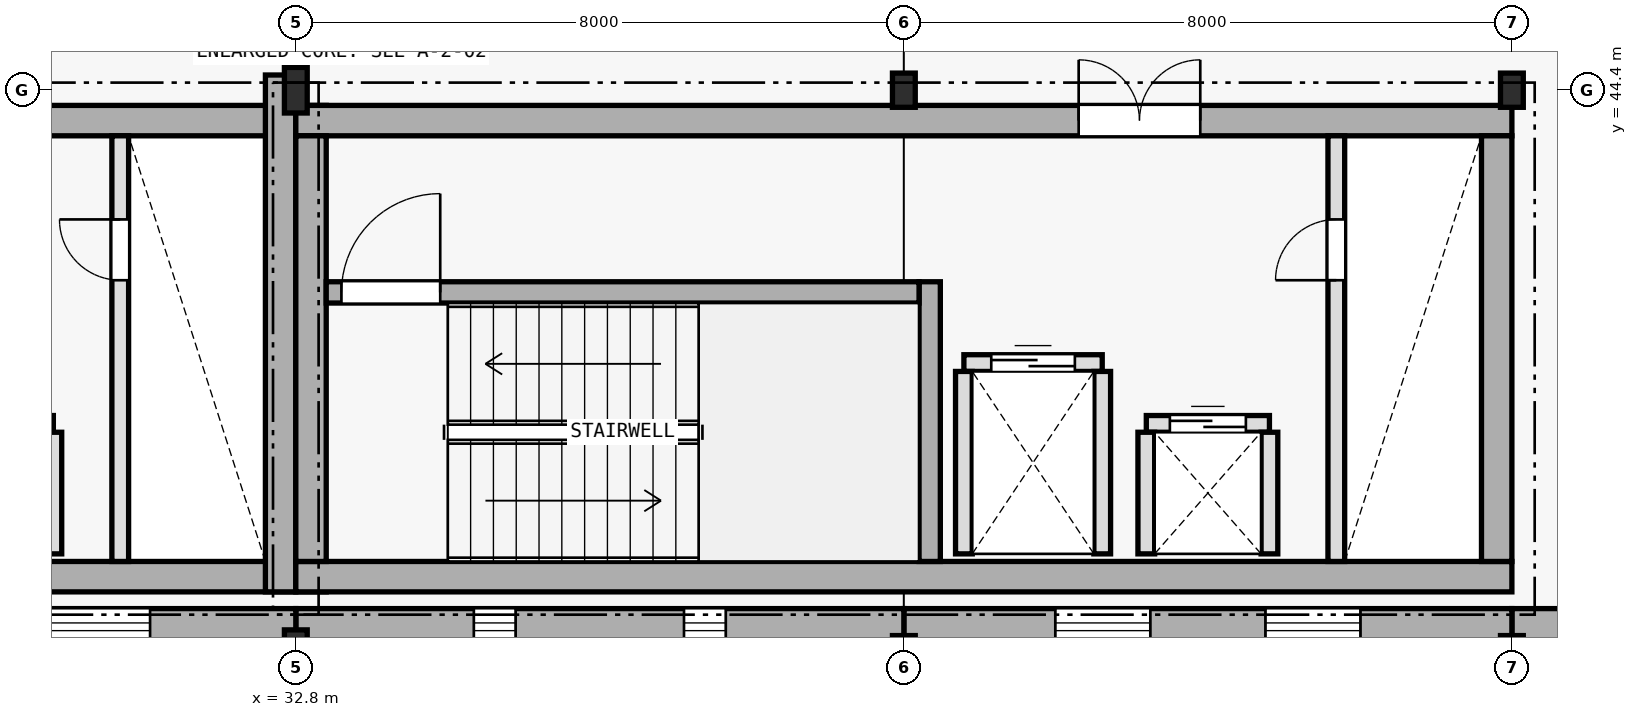
"""IFC4 building model, lengths in metres.
Left out: names, types, materials, properties, quantities, classifications, styles, units other than length and angle.
Written with IfcOpenShell. Run it as: python <this file> out.ifc"""

import sys

from ifc_helpers import new_model, si_unit, direction, frame, frame_2d, origin, origin_2d, place, context, subcontext, project, spatial, rectangle, i_section, extrude, element, fill, save


model = new_model("IFC4")
c1 = context("Model", 3, precision=1e-05, world=origin(), true_north=direction((0.0, 1.0)))
c2 = subcontext(c1, "Body", "Model", "MODEL_VIEW")
j1 = project(units=[si_unit("LENGTHUNIT", "METRE"), si_unit("PLANEANGLEUNIT", "RADIAN")], contexts=[c1])
p1 = place(None, origin())
s1 = spatial("IfcSite", under=j1, at=p1, CompositionType="ELEMENT")
p2 = place(p1, origin())
s2 = spatial("IfcBuilding", under=s1, at=p2, CompositionType="ELEMENT")
p3 = place(p2, frame((0.0, 0.0, 9.9)))
s3 = spatial("IfcBuildingStorey", under=s2, at=p3, CompositionType="ELEMENT", Elevation=9.9)
p4 = place(p3, frame((16.8, 38.0, 0.0), z_axis=(0.0, 0.0, 1.0), x_axis=(1.0, 0.0, 0.0)))
e1 = element("IfcWall", 1, at=p4, inside=s3, PredefinedType="SHEAR", context=c2, shape_type="SweptSolid", body=[
    extrude(rectangle(XDim=16.4, YDim=0.4, at=frame_2d((8.2, 0.0))), origin(), (0.0, 0.0, 1.0), 4.195),
])
p5 = place(p3, frame((16.8, 44.0, 0.0), z_axis=(0.0, 0.0, 1.0), x_axis=(1.0, 0.0, 0.0)))
e2 = element("IfcWall", 2, at=p5, inside=s3, PredefinedType="SHEAR", context=c2, shape_type="SweptSolid", body=[
    extrude(rectangle(XDim=16.4, YDim=0.4, at=frame_2d((8.2, 0.0))), origin(), (0.0, 0.0, 1.0), 4.195),
])
p6 = place(p5, frame((10.3, 0.0, 0.0)))
e3 = element("IfcOpeningElement", 3, at=p6, cuts=e2, PredefinedType="OPENING", context=c2, shape_type="SweptSolid", body=[
    extrude(rectangle(XDim=1.6, YDim=2.2, at=frame_2d((0.8, 1.1))), frame((0.0, 0.21, 0.0), z_axis=(0.0, -1.0, 0.0), x_axis=(1.0, 0.0, 0.0)), (0.0, 0.0, 1.0), 0.42),
])
p7 = place(p3, frame((32.6, 37.8, 0.0), z_axis=(0.0, 0.0, 1.0), x_axis=(0.0, 1.0, 0.0)))
e4 = element("IfcWall", 4, at=p7, inside=s3, PredefinedType="SHEAR", context=c2, shape_type="SweptSolid", body=[
    extrude(rectangle(XDim=6.8, YDim=0.4, at=frame_2d((3.4, 0.0))), origin(), (0.0, 0.0, 1.0), 4.195),
])
p8 = place(p3, frame((32.8, 38.0, 0.0), z_axis=(0.0, 0.0, 1.0), x_axis=(1.0, 0.0, 0.0)))
e5 = element("IfcWall", 5, at=p8, inside=s3, PredefinedType="SHEAR", context=c2, shape_type="SweptSolid", body=[
    extrude(rectangle(XDim=16.0, YDim=0.4, at=frame_2d((8.0, 0.0))), origin(), (0.0, 0.0, 1.0), 4.195),
])
p9 = place(p3, frame((32.8, 44.0, 0.0), z_axis=(0.0, 0.0, 1.0), x_axis=(1.0, 0.0, 0.0)))
e6 = element("IfcWall", 6, at=p9, inside=s3, PredefinedType="SHEAR", context=c2, shape_type="SweptSolid", body=[
    extrude(rectangle(XDim=16.0, YDim=0.4, at=frame_2d((8.0, 0.0))), origin(), (0.0, 0.0, 1.0), 4.195),
])
p10 = place(p9, frame((10.3, 0.0, 0.0)))
e7 = element("IfcOpeningElement", 7, at=p10, cuts=e6, PredefinedType="OPENING", context=c2, shape_type="SweptSolid", body=[
    extrude(rectangle(XDim=1.6, YDim=2.2, at=frame_2d((0.8, 1.1))), frame((0.0, 0.21, 0.0), z_axis=(0.0, -1.0, 0.0), x_axis=(1.0, 0.0, 0.0)), (0.0, 0.0, 1.0), 0.42),
])
for number, where, z_axis, x_axis in (
    (8, (33.0, 38.2, 0.0), (0.0, 0.0, 1.0), (0.0, 1.0, 0.0)),
    (9, (48.6, 38.2, 0.0), (0.0, 0.0, 1.0), (0.0, 1.0, 0.0)),
):
    element("IfcWall", number, at=place(p3, frame(where, z_axis=z_axis, x_axis=x_axis)), inside=s3, PredefinedType="SHEAR", context=c2, shape_type="SweptSolid", body=[
        extrude(rectangle(XDim=5.6, YDim=0.4, at=frame_2d((2.8, 0.0))), origin(), (0.0, 0.0, 1.0), 4.195),
    ])
p11 = place(p3, frame((41.14, 38.2, 0.0), z_axis=(0.0, 0.0, 1.0), x_axis=(0.0, 1.0, 0.0)))
e10 = element("IfcWall", 10, at=p11, inside=s3, PredefinedType="SHEAR", context=c2, shape_type="SweptSolid", body=[
    extrude(rectangle(XDim=3.68, YDim=0.28, at=frame_2d((1.84, 0.0))), origin(), (0.0, 0.0, 1.0), 4.195),
])
p12 = place(p3, frame((33.2, 41.74, 0.0), z_axis=(0.0, 0.0, 1.0), x_axis=(1.0, 0.0, 0.0)))
e11 = element("IfcWall", 11, at=p12, inside=s3, PredefinedType="SHEAR", context=c2, shape_type="SweptSolid", body=[
    extrude(rectangle(XDim=7.8, YDim=0.28, at=frame_2d((3.9, 0.0))), origin(), (0.0, 0.0, 1.0), 4.195),
])
p13 = place(p12, frame((0.2, 0.0, 0.0)))
e12 = element("IfcOpeningElement", 12, at=p13, cuts=e11, PredefinedType="OPENING", context=c2, shape_type="SweptSolid", body=[
    extrude(rectangle(XDim=1.3, YDim=2.2, at=frame_2d((0.65, 1.1))), frame((0.0, 0.15, 0.0), z_axis=(0.0, -1.0, 0.0), x_axis=(1.0, 0.0, 0.0)), (0.0, 0.0, 1.0), 0.3),
])
for number, where, z_axis, x_axis in (
    (13, (32.8, 37.0, 0.0), (0.0, 0.0, 1.0), (1.0, 0.0, 0.0)),
    (14, (32.8, 44.4, 0.0), (0.0, 0.0, 1.0), (1.0, 0.0, 0.0)),
):
    element("IfcColumn", number, at=place(p3, frame(where, z_axis=z_axis, x_axis=x_axis)), inside=s3, PredefinedType="COLUMN", context=c2, shape_type="SweptSolid", body=[
        extrude(i_section(OverallWidth=0.3, OverallDepth=0.6, WebThickness=0.015, FlangeThickness=0.03, FilletRadius=0.027, at=origin_2d()), origin(), (0.0, 0.0, 1.0), 4.2),
    ])
for number, where, z_axis, x_axis in (
    (15, (40.8, 37.0, 0.0), (0.0, 0.0, 1.0), (1.0, 0.0, 0.0)),
    (16, (40.8, 44.4, 0.0), (0.0, 0.0, 1.0), (1.0, 0.0, 0.0)),
    (17, (48.8, 37.0, 0.0), (0.0, 0.0, 1.0), (1.0, 0.0, 0.0)),
    (18, (48.8, 44.4, 0.0), (0.0, 0.0, 1.0), (1.0, 0.0, 0.0)),
):
    element("IfcColumn", number, at=place(p3, frame(where, z_axis=z_axis, x_axis=x_axis)), inside=s3, PredefinedType="COLUMN", context=c2, shape_type="SweptSolid", body=[
        extrude(i_section(OverallWidth=0.3, OverallDepth=0.45, WebThickness=0.014, FlangeThickness=0.026, FilletRadius=0.027, at=origin_2d()), origin(), (0.0, 0.0, 1.0), 4.2),
    ])
p14 = place(p3, frame((56.612, 37.29, 0.0), z_axis=(0.0, 0.0, 1.0), x_axis=(-1.0, 0.0, 0.0)))
e19 = element("IfcWall", 19, at=p14, inside=s3, PredefinedType="STANDARD", context=c2, shape_type="SweptSolid", body=[
    extrude(rectangle(XDim=7.812, YDim=0.58, at=frame_2d((3.906, 0.0))), origin(), (0.0, 0.0, 1.0), 3.955),
])
p15 = place(p14, frame((2.901, 0.0, 0.9)))
e20 = element("IfcOpeningElement", 20, at=p15, cuts=e19, PredefinedType="OPENING", context=c2, shape_type="SweptSolid", body=[
    extrude(rectangle(XDim=1.85, YDim=2.2, at=frame_2d((0.925, 1.1))), frame((0.0, 0.3, 0.0), z_axis=(0.0, -1.0, 0.0), x_axis=(1.0, 0.0, 0.0)), (0.0, 0.0, 1.0), 0.6),
])
p16 = place(p3, frame((48.8, 37.29, 0.0), z_axis=(0.0, 0.0, 1.0), x_axis=(-1.0, 0.0, 0.0)))
e21 = element("IfcWall", 21, at=p16, inside=s3, PredefinedType="STANDARD", context=c2, shape_type="SweptSolid", body=[
    extrude(rectangle(XDim=8.0, YDim=0.58, at=frame_2d((4.0, 0.0))), origin(), (0.0, 0.0, 1.0), 3.955),
])
p17 = place(p16, frame((1.993, 0.0, 0.9)))
e22 = element("IfcOpeningElement", 22, at=p17, cuts=e21, PredefinedType="OPENING", context=c2, shape_type="SweptSolid", body=[
    extrude(rectangle(XDim=1.25, YDim=2.45, at=frame_2d((0.625, 1.225))), frame((0.0, 0.3, 0.0), z_axis=(0.0, -1.0, 0.0), x_axis=(1.0, 0.0, 0.0)), (0.0, 0.0, 1.0), 0.6),
])
p18 = place(p16, frame((4.757, 0.0, 0.9)))
e23 = element("IfcOpeningElement", 23, at=p18, cuts=e21, PredefinedType="OPENING", context=c2, shape_type="SweptSolid", body=[
    extrude(rectangle(XDim=1.25, YDim=2.45, at=frame_2d((0.625, 1.225))), frame((0.0, 0.3, 0.0), z_axis=(0.0, -1.0, 0.0), x_axis=(1.0, 0.0, 0.0)), (0.0, 0.0, 1.0), 0.6),
])
p19 = place(p3, frame((40.8, 37.29, 0.0), z_axis=(0.0, 0.0, 1.0), x_axis=(-1.0, 0.0, 0.0)))
e24 = element("IfcWall", 24, at=p19, inside=s3, PredefinedType="STANDARD", context=c2, shape_type="SweptSolid", body=[
    extrude(rectangle(XDim=8.0, YDim=0.58, at=frame_2d((4.0, 0.0))), origin(), (0.0, 0.0, 1.0), 3.955),
])
p20 = place(p19, frame((2.343, 0.0, 0.9)))
e25 = element("IfcOpeningElement", 25, at=p20, cuts=e24, PredefinedType="OPENING", context=c2, shape_type="SweptSolid", body=[
    extrude(rectangle(XDim=0.55, YDim=1.75, at=frame_2d((0.275, 0.875))), frame((0.0, 0.3, 0.0), z_axis=(0.0, -1.0, 0.0), x_axis=(1.0, 0.0, 0.0)), (0.0, 0.0, 1.0), 0.6),
])
p21 = place(p19, frame((5.107, 0.0, 0.9)))
e26 = element("IfcOpeningElement", 26, at=p21, cuts=e24, PredefinedType="OPENING", context=c2, shape_type="SweptSolid", body=[
    extrude(rectangle(XDim=0.55, YDim=1.75, at=frame_2d((0.275, 0.875))), frame((0.0, 0.3, 0.0), z_axis=(0.0, -1.0, 0.0), x_axis=(1.0, 0.0, 0.0)), (0.0, 0.0, 1.0), 0.6),
])
p22 = place(p3, frame((32.8, 37.29, 0.0), z_axis=(0.0, 0.0, 1.0), x_axis=(-1.0, 0.0, 0.0)))
e27 = element("IfcWall", 27, at=p22, inside=s3, PredefinedType="STANDARD", context=c2, shape_type="SweptSolid", body=[
    extrude(rectangle(XDim=8.0, YDim=0.58, at=frame_2d((4.0, 0.0))), origin(), (0.0, 0.0, 1.0), 3.955),
])
p23 = place(p22, frame((1.917, 0.0, 0.9)))
e28 = element("IfcOpeningElement", 28, at=p23, cuts=e27, PredefinedType="OPENING", context=c2, shape_type="SweptSolid", body=[
    extrude(rectangle(XDim=1.4, YDim=1.75, at=frame_2d((0.7, 0.875))), frame((0.0, 0.3, 0.0), z_axis=(0.0, -1.0, 0.0), x_axis=(1.0, 0.0, 0.0)), (0.0, 0.0, 1.0), 0.6),
])
p24 = place(p22, frame((4.682, 0.0, 0.9)))
e29 = element("IfcOpeningElement", 29, at=p24, cuts=e27, PredefinedType="OPENING", context=c2, shape_type="SweptSolid", body=[
    extrude(rectangle(XDim=1.4, YDim=1.75, at=frame_2d((0.7, 0.875))), frame((0.0, 0.3, 0.0), z_axis=(0.0, -1.0, 0.0), x_axis=(1.0, 0.0, 0.0)), (0.0, 0.0, 1.0), 0.6),
])
p25 = place(p3, frame((27.99, 40.01, 0.0), z_axis=(0.0, 0.0, 1.0), x_axis=(1.0, 0.0, 0.0)))
e30 = element("IfcWall", 30, at=p25, inside=s3, PredefinedType="PLUMBINGWALL", context=c2, shape_type="SweptSolid", body=[
    extrude(rectangle(XDim=1.62, YDim=0.22, at=frame_2d((0.81, 0.0))), origin(), (0.0, 0.0, 1.0), 3.92),
])
p26 = place(p25, frame((0.31, 0.0, 0.0)))
e31 = element("IfcOpeningElement", 31, at=p26, cuts=e30, PredefinedType="OPENING", context=c2, shape_type="SweptSolid", body=[
    extrude(rectangle(XDim=1.0, YDim=2.2, at=frame_2d((0.5, 1.1))), frame((0.0, 0.12, 0.0), z_axis=(0.0, -1.0, 0.0), x_axis=(1.0, 0.0, 0.0)), (0.0, 0.0, 1.0), 0.24),
])
p27 = place(p3, frame((29.61, 38.3, 0.0), z_axis=(0.0, 0.0, 1.0), x_axis=(0.0, 1.0, 0.0)))
e32 = element("IfcWall", 32, at=p27, inside=s3, PredefinedType="PLUMBINGWALL", context=c2, shape_type="SweptSolid", body=[
    extrude(rectangle(XDim=1.6, YDim=0.22, at=frame_2d((0.8, 0.0))), origin(), (0.0, 0.0, 1.0), 3.92),
])
p28 = place(p3, frame((30.49, 38.2, 0.0), z_axis=(0.0, 0.0, 1.0), x_axis=(0.0, 1.0, 0.0)))
e33 = element("IfcWall", 33, at=p28, inside=s3, PredefinedType="PLUMBINGWALL", context=c2, shape_type="SweptSolid", body=[
    extrude(rectangle(XDim=5.6, YDim=0.22, at=frame_2d((2.8, 0.0))), origin(), (0.0, 0.0, 1.0), 3.92),
])
p29 = place(p28, frame((3.7, 0.0, 0.0)))
e34 = element("IfcOpeningElement", 34, at=p29, cuts=e33, PredefinedType="OPENING", context=c2, shape_type="SweptSolid", body=[
    extrude(rectangle(XDim=0.8, YDim=2.1, at=frame_2d((0.4, 1.05))), frame((0.0, 0.12, 0.0), z_axis=(0.0, -1.0, 0.0), x_axis=(1.0, 0.0, 0.0)), (0.0, 0.0, 1.0), 0.24),
])
p30 = place(p3, frame((41.59, 40.81, 0.0), z_axis=(0.0, 0.0, 1.0), x_axis=(1.0, 0.0, 0.0)))
e35 = element("IfcWall", 35, at=p30, inside=s3, PredefinedType="PLUMBINGWALL", context=c2, shape_type="SweptSolid", body=[
    extrude(rectangle(XDim=1.82, YDim=0.22, at=frame_2d((0.91, 0.0))), origin(), (0.0, 0.0, 1.0), 3.92),
])
p31 = place(p30, frame((0.36, 0.0, 0.0)))
e36 = element("IfcOpeningElement", 36, at=p31, cuts=e35, PredefinedType="OPENING", context=c2, shape_type="SweptSolid", body=[
    extrude(rectangle(XDim=1.1, YDim=2.2, at=frame_2d((0.55, 1.1))), frame((0.0, 0.12, 0.0), z_axis=(0.0, -1.0, 0.0), x_axis=(1.0, 0.0, 0.0)), (0.0, 0.0, 1.0), 0.24),
])
for number, where, z_axis, x_axis in (
    (37, (41.59, 38.3, 0.0), (0.0, 0.0, 1.0), (0.0, 1.0, 0.0)),
    (38, (43.41, 38.3, 0.0), (0.0, 0.0, 1.0), (0.0, 1.0, 0.0)),
):
    element("IfcWall", number, at=place(p3, frame(where, z_axis=z_axis, x_axis=x_axis)), inside=s3, PredefinedType="PLUMBINGWALL", context=c2, shape_type="SweptSolid", body=[
        extrude(rectangle(XDim=2.4, YDim=0.22, at=frame_2d((1.2, 0.0))), origin(), (0.0, 0.0, 1.0), 3.92),
    ])
p32 = place(p3, frame((43.99, 40.01, 0.0), z_axis=(0.0, 0.0, 1.0), x_axis=(1.0, 0.0, 0.0)))
e39 = element("IfcWall", 39, at=p32, inside=s3, PredefinedType="PLUMBINGWALL", context=c2, shape_type="SweptSolid", body=[
    extrude(rectangle(XDim=1.62, YDim=0.22, at=frame_2d((0.81, 0.0))), origin(), (0.0, 0.0, 1.0), 3.92),
])
p33 = place(p32, frame((0.31, 0.0, 0.0)))
e40 = element("IfcOpeningElement", 40, at=p33, cuts=e39, PredefinedType="OPENING", context=c2, shape_type="SweptSolid", body=[
    extrude(rectangle(XDim=1.0, YDim=2.2, at=frame_2d((0.5, 1.1))), frame((0.0, 0.12, 0.0), z_axis=(0.0, -1.0, 0.0), x_axis=(1.0, 0.0, 0.0)), (0.0, 0.0, 1.0), 0.24),
])
for number, where, z_axis, x_axis in (
    (41, (43.99, 38.3, 0.0), (0.0, 0.0, 1.0), (0.0, 1.0, 0.0)),
    (42, (45.61, 38.3, 0.0), (0.0, 0.0, 1.0), (0.0, 1.0, 0.0)),
):
    element("IfcWall", number, at=place(p3, frame(where, z_axis=z_axis, x_axis=x_axis)), inside=s3, PredefinedType="PLUMBINGWALL", context=c2, shape_type="SweptSolid", body=[
        extrude(rectangle(XDim=1.6, YDim=0.22, at=frame_2d((0.8, 0.0))), origin(), (0.0, 0.0, 1.0), 3.92),
    ])
p34 = place(p3, frame((46.49, 38.2, 0.0), z_axis=(0.0, 0.0, 1.0), x_axis=(0.0, 1.0, 0.0)))
e43 = element("IfcWall", 43, at=p34, inside=s3, PredefinedType="PLUMBINGWALL", context=c2, shape_type="SweptSolid", body=[
    extrude(rectangle(XDim=5.6, YDim=0.22, at=frame_2d((2.8, 0.0))), origin(), (0.0, 0.0, 1.0), 3.92),
])
p35 = place(p34, frame((3.7, 0.0, 0.0)))
e44 = element("IfcOpeningElement", 44, at=p35, cuts=e43, PredefinedType="OPENING", context=c2, shape_type="SweptSolid", body=[
    extrude(rectangle(XDim=0.8, YDim=2.1, at=frame_2d((0.4, 1.05))), frame((0.0, 0.12, 0.0), z_axis=(0.0, -1.0, 0.0), x_axis=(1.0, 0.0, 0.0)), (0.0, 0.0, 1.0), 0.24),
])
p36 = place(p17, origin())
e45 = element("IfcWindow", 45, at=p36, inside=s3, PartitioningType="SINGLE_PANEL", PredefinedType="WINDOW", context=c2, shape_type="SweptSolid", body=[
    extrude(rectangle(XDim=1.25, YDim=2.45, at=frame_2d((0.625, 1.225))), frame((0.0, 0.03, 0.0), z_axis=(0.0, -1.0, 0.0), x_axis=(1.0, 0.0, 0.0)), (0.0, 0.0, 1.0), 0.06),
])
fill(e22, e45)
p37 = place(p18, origin())
e46 = element("IfcWindow", 46, at=p37, inside=s3, PartitioningType="SINGLE_PANEL", PredefinedType="WINDOW", context=c2, shape_type="SweptSolid", body=[
    extrude(rectangle(XDim=1.25, YDim=2.45, at=frame_2d((0.625, 1.225))), frame((0.0, 0.03, 0.0), z_axis=(0.0, -1.0, 0.0), x_axis=(1.0, 0.0, 0.0)), (0.0, 0.0, 1.0), 0.06),
])
fill(e23, e46)
p38 = place(p20, origin())
e47 = element("IfcWindow", 47, at=p38, inside=s3, PartitioningType="SINGLE_PANEL", PredefinedType="WINDOW", context=c2, shape_type="SweptSolid", body=[
    extrude(rectangle(XDim=0.55, YDim=1.75, at=frame_2d((0.275, 0.875))), frame((0.0, 0.03, 0.0), z_axis=(0.0, -1.0, 0.0), x_axis=(1.0, 0.0, 0.0)), (0.0, 0.0, 1.0), 0.06),
])
fill(e25, e47)
p39 = place(p21, origin())
e48 = element("IfcWindow", 48, at=p39, inside=s3, PartitioningType="SINGLE_PANEL", PredefinedType="WINDOW", context=c2, shape_type="SweptSolid", body=[
    extrude(rectangle(XDim=0.55, YDim=1.75, at=frame_2d((0.275, 0.875))), frame((0.0, 0.03, 0.0), z_axis=(0.0, -1.0, 0.0), x_axis=(1.0, 0.0, 0.0)), (0.0, 0.0, 1.0), 0.06),
])
fill(e26, e48)
p40 = place(p23, origin())
e49 = element("IfcWindow", 49, at=p40, inside=s3, PartitioningType="SINGLE_PANEL", PredefinedType="WINDOW", context=c2, shape_type="SweptSolid", body=[
    extrude(rectangle(XDim=1.4, YDim=1.75, at=frame_2d((0.7, 0.875))), frame((0.0, 0.03, 0.0), z_axis=(0.0, -1.0, 0.0), x_axis=(1.0, 0.0, 0.0)), (0.0, 0.0, 1.0), 0.06),
])
fill(e28, e49)
p41 = place(p29, origin())
e50 = element("IfcDoor", 50, at=p41, inside=s3, OperationType="SINGLE_SWING_RIGHT", PredefinedType="DOOR", context=c2, shape_type="SweptSolid", body=[
    extrude(rectangle(XDim=0.8, YDim=2.1, at=frame_2d((0.4, 1.05))), frame((0.0, 0.025, 0.0), z_axis=(0.0, -1.0, 0.0), x_axis=(1.0, 0.0, 0.0)), (0.0, 0.0, 1.0), 0.05),
])
fill(e34, e50)
p42 = place(p13, origin())
e51 = element("IfcDoor", 51, at=p42, inside=s3, OperationType="SINGLE_SWING_RIGHT", PredefinedType="DOOR", context=c2, shape_type="SweptSolid", body=[
    extrude(rectangle(XDim=1.3, YDim=2.2, at=frame_2d((0.65, 1.1))), frame((0.0, 0.025, 0.0), z_axis=(0.0, -1.0, 0.0), x_axis=(1.0, 0.0, 0.0)), (0.0, 0.0, 1.0), 0.05),
])
fill(e12, e51)
p43 = place(p31, origin())
e52 = element("IfcDoor", 52, at=p43, inside=s3, OperationType="DOUBLE_DOOR_SLIDING", PredefinedType="DOOR", context=c2, shape_type="SweptSolid", body=[
    extrude(rectangle(XDim=1.1, YDim=2.2, at=frame_2d((0.55, 1.1))), frame((0.0, 0.025, 0.0), z_axis=(0.0, -1.0, 0.0), x_axis=(1.0, 0.0, 0.0)), (0.0, 0.0, 1.0), 0.05),
])
fill(e36, e52)
p44 = place(p33, origin())
e53 = element("IfcDoor", 53, at=p44, inside=s3, OperationType="DOUBLE_DOOR_SLIDING", PredefinedType="DOOR", context=c2, shape_type="SweptSolid", body=[
    extrude(rectangle(XDim=1.0, YDim=2.2, at=frame_2d((0.5, 1.1))), frame((0.0, 0.025, 0.0), z_axis=(0.0, -1.0, 0.0), x_axis=(1.0, 0.0, 0.0)), (0.0, 0.0, 1.0), 0.05),
])
fill(e40, e53)
p45 = place(p35, origin())
e54 = element("IfcDoor", 54, at=p45, inside=s3, OperationType="SINGLE_SWING_LEFT", PredefinedType="DOOR", context=c2, shape_type="SweptSolid", body=[
    extrude(rectangle(XDim=0.8, YDim=2.1, at=frame_2d((0.4, 1.05))), frame((0.0, 0.025, 0.0), z_axis=(0.0, -1.0, 0.0), x_axis=(1.0, 0.0, 0.0)), (0.0, 0.0, 1.0), 0.05),
])
fill(e44, e54)
p46 = place(p10, origin())
e55 = element("IfcDoor", 55, at=p46, inside=s3, OperationType="DOUBLE_DOOR_SINGLE_SWING", PredefinedType="DOOR", context=c2, shape_type="SweptSolid", body=[
    extrude(rectangle(XDim=1.6, YDim=2.2, at=frame_2d((0.8, 1.1))), frame((0.0, 0.025, 0.0), z_axis=(0.0, -1.0, 0.0), x_axis=(1.0, 0.0, 0.0)), (0.0, 0.0, 1.0), 0.05),
])
fill(e7, e55)
save(model, sys.argv[1])
